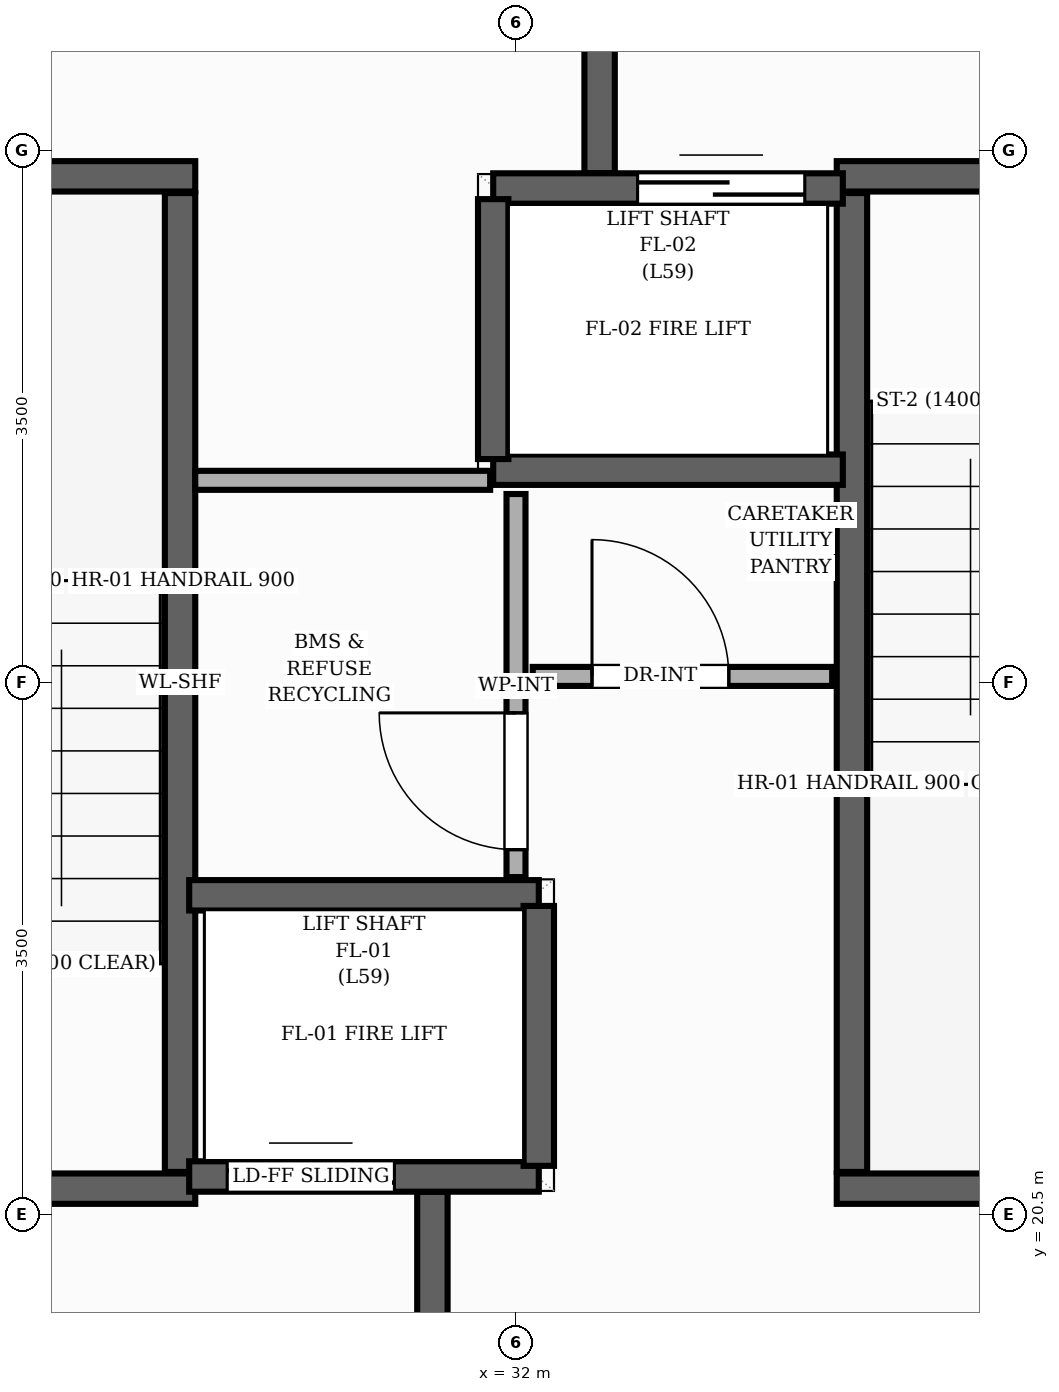
"""IFC4 building model, lengths in metres.
Left out: names, types, materials, properties, quantities, classifications, styles, units other than length and angle.
Written with IfcOpenShell. Run it as: python <this file> out.ifc"""

import sys

from ifc_helpers import new_model, si_unit, direction, frame, frame_2d, origin, place, context, subcontext, project, spatial, rectangle, extrude, element, fill, save


model = new_model("IFC4")
c1 = context("Model", 3, precision=1e-05, world=origin(), true_north=direction((0.0, 1.0)))
c2 = subcontext(c1, "Body", "Model", "MODEL_VIEW")
j1 = project(units=[si_unit("LENGTHUNIT", "METRE"), si_unit("PLANEANGLEUNIT", "RADIAN")], contexts=[c1])
p1 = place(None, origin())
s1 = spatial("IfcSite", under=j1, at=p1, CompositionType="ELEMENT")
p2 = place(p1, origin())
s2 = spatial("IfcBuilding", under=s1, at=p2, CompositionType="ELEMENT")
p3 = place(p2, frame((0.0, 0.0, 195.04)))
s3 = spatial("IfcBuildingStorey", under=s2, at=p3, CompositionType="ELEMENT", Elevation=195.04)
p4 = place(p3, frame((29.79, 20.78, 0.0), z_axis=(0.0, 0.0, 1.0), x_axis=(0.0, 1.0, 0.0)))
e1 = element("IfcWall", 1, at=p4, inside=s3, PredefinedType="SHEAR", context=c2, shape_type="SweptSolid", body=[
    extrude(rectangle(XDim=6.44, YDim=0.2, at=frame_2d((3.22, 0.0))), origin(), (0.0, 0.0, 1.0), 3.2),
])
p5 = place(p3, frame((26.65, 27.33, 0.0), z_axis=(0.0, 0.0, 1.0), x_axis=(1.0, 0.0, 0.0)))
e2 = element("IfcWall", 2, at=p5, inside=s3, PredefinedType="SHEAR", context=c2, shape_type="SweptSolid", body=[
    extrude(rectangle(XDim=3.24, YDim=0.2, at=frame_2d((1.62, 0.0))), origin(), (0.0, 0.0, 1.0), 3.2),
])
p6 = place(p3, frame((26.65, 20.67, 0.0), z_axis=(0.0, 0.0, 1.0), x_axis=(1.0, 0.0, 0.0)))
e3 = element("IfcWall", 3, at=p6, inside=s3, PredefinedType="SHEAR", context=c2, shape_type="SweptSolid", body=[
    extrude(rectangle(XDim=3.24, YDim=0.2, at=frame_2d((1.62, 0.0))), origin(), (0.0, 0.0, 1.0), 3.2),
])
p7 = place(p6, frame((1.055, 0.0, 0.0)))
e4 = element("IfcOpeningElement", 4, at=p7, cuts=e3, PredefinedType="OPENING", context=c2, shape_type="SweptSolid", body=[
    extrude(rectangle(XDim=1.05, YDim=2.15, at=frame_2d((0.525, 1.075))), frame((0.0, 0.11, 0.0), z_axis=(0.0, -1.0, 0.0), x_axis=(1.0, 0.0, 0.0)), (0.0, 0.0, 1.0), 0.22),
])
p8 = place(p3, frame((34.21, 20.78, 0.0), z_axis=(0.0, 0.0, 1.0), x_axis=(0.0, 1.0, 0.0)))
e5 = element("IfcWall", 5, at=p8, inside=s3, PredefinedType="SHEAR", context=c2, shape_type="SweptSolid", body=[
    extrude(rectangle(XDim=6.44, YDim=0.2, at=frame_2d((3.22, 0.0))), origin(), (0.0, 0.0, 1.0), 3.2),
])
p9 = place(p3, frame((34.11, 20.67, 0.0), z_axis=(0.0, 0.0, 1.0), x_axis=(1.0, 0.0, 0.0)))
e6 = element("IfcWall", 6, at=p9, inside=s3, PredefinedType="SHEAR", context=c2, shape_type="SweptSolid", body=[
    extrude(rectangle(XDim=3.24, YDim=0.2, at=frame_2d((1.62, 0.0))), origin(), (0.0, 0.0, 1.0), 3.2),
])
p10 = place(p3, frame((34.11, 27.33, 0.0), z_axis=(0.0, 0.0, 1.0), x_axis=(1.0, 0.0, 0.0)))
e7 = element("IfcWall", 7, at=p10, inside=s3, PredefinedType="SHEAR", context=c2, shape_type="SweptSolid", body=[
    extrude(rectangle(XDim=3.24, YDim=0.2, at=frame_2d((1.62, 0.0))), origin(), (0.0, 0.0, 1.0), 3.2),
])
p11 = place(p10, frame((1.135, 0.0, 0.0)))
e8 = element("IfcOpeningElement", 8, at=p11, cuts=e7, PredefinedType="OPENING", context=c2, shape_type="SweptSolid", body=[
    extrude(rectangle(XDim=1.05, YDim=2.15, at=frame_2d((0.525, 1.075))), frame((0.0, 0.11, 0.0), z_axis=(0.0, -1.0, 0.0), x_axis=(1.0, 0.0, 0.0)), (0.0, 0.0, 1.0), 0.22),
])
for number, where, z_axis, x_axis in (
    (9, (31.45, 17.15, 0.0), (0.0, 0.0, 1.0), (0.0, 1.0, 0.0)),
    (10, (32.55, 27.35, 0.0), (0.0, 0.0, 1.0), (0.0, 1.0, 0.0)),
):
    element("IfcWall", number, at=place(p3, frame(where, z_axis=z_axis, x_axis=x_axis)), inside=s3, PredefinedType="SHEAR", context=c2, shape_type="SweptSolid", body=[
        extrude(rectangle(XDim=3.5, YDim=0.2, at=frame_2d((1.75, 0.0))), origin(), (0.0, 0.0, 1.0), 3.2),
    ])
p12 = place(p3, frame((29.85, 20.75, 0.0), z_axis=(0.0, 0.0, 1.0), x_axis=(1.0, 0.0, 0.0)))
e11 = element("IfcWall", 11, at=p12, inside=s3, PredefinedType="SHEAR", context=c2, shape_type="SweptSolid", body=[
    extrude(rectangle(XDim=2.3, YDim=0.2, at=frame_2d((1.15, 0.0))), origin(), (0.0, 0.0, 1.0), 3.2),
])
p13 = place(p12, frame((0.25, 0.0, 0.0)))
e12 = element("IfcOpeningElement", 12, at=p13, cuts=e11, PredefinedType="OPENING", context=c2, shape_type="SweptSolid", body=[
    extrude(rectangle(XDim=1.1, YDim=2.15, at=frame_2d((0.55, 1.075))), frame((0.0, 0.11, 0.0), z_axis=(0.0, -1.0, 0.0), x_axis=(1.0, 0.0, 0.0)), (0.0, 0.0, 1.0), 0.22),
])
p14 = place(p3, frame((29.85, 22.6, 0.0), z_axis=(0.0, 0.0, 1.0), x_axis=(1.0, 0.0, 0.0)))
e13 = element("IfcWall", 13, at=p14, inside=s3, PredefinedType="SHEAR", context=c2, shape_type="SweptSolid", body=[
    extrude(rectangle(XDim=2.3, YDim=0.2, at=frame_2d((1.15, 0.0))), origin(), (0.0, 0.0, 1.0), 3.2),
])
p15 = place(p3, frame((32.15, 20.82, 0.0), z_axis=(0.0, 0.0, 1.0), x_axis=(0.0, 1.0, 0.0)))
e14 = element("IfcWall", 14, at=p15, inside=s3, PredefinedType="SHEAR", context=c2, shape_type="SweptSolid", body=[
    extrude(rectangle(XDim=1.71, YDim=0.2, at=frame_2d((0.855, 0.0))), origin(), (0.0, 0.0, 1.0), 3.2),
])
p16 = place(p3, frame((31.85, 27.25, 0.0), z_axis=(0.0, 0.0, 1.0), x_axis=(1.0, 0.0, 0.0)))
e15 = element("IfcWall", 15, at=p16, inside=s3, PredefinedType="SHEAR", context=c2, shape_type="SweptSolid", body=[
    extrude(rectangle(XDim=2.3, YDim=0.2, at=frame_2d((1.15, 0.0))), origin(), (0.0, 0.0, 1.0), 3.2),
])
p17 = place(p16, frame((0.95, 0.0, 0.0)))
e16 = element("IfcOpeningElement", 16, at=p17, cuts=e15, PredefinedType="OPENING", context=c2, shape_type="SweptSolid", body=[
    extrude(rectangle(XDim=1.1, YDim=2.15, at=frame_2d((0.55, 1.075))), frame((0.0, 0.11, 0.0), z_axis=(0.0, -1.0, 0.0), x_axis=(1.0, 0.0, 0.0)), (0.0, 0.0, 1.0), 0.22),
])
p18 = place(p3, frame((31.85, 25.4, 0.0), z_axis=(0.0, 0.0, 1.0), x_axis=(1.0, 0.0, 0.0)))
e17 = element("IfcWall", 17, at=p18, inside=s3, PredefinedType="SHEAR", context=c2, shape_type="SweptSolid", body=[
    extrude(rectangle(XDim=2.3, YDim=0.2, at=frame_2d((1.15, 0.0))), origin(), (0.0, 0.0, 1.0), 3.2),
])
p19 = place(p3, frame((31.85, 25.47, 0.0), z_axis=(0.0, 0.0, 1.0), x_axis=(0.0, 1.0, 0.0)))
e18 = element("IfcWall", 18, at=p19, inside=s3, PredefinedType="SHEAR", context=c2, shape_type="SweptSolid", body=[
    extrude(rectangle(XDim=1.71, YDim=0.2, at=frame_2d((0.855, 0.0))), origin(), (0.0, 0.0, 1.0), 3.2),
])
p20 = place(p3, frame((32.0, 22.72, 0.0), z_axis=(0.0, 0.0, 1.0), x_axis=(0.0, 1.0, 0.0)))
e19 = element("IfcWall", 19, at=p20, inside=s3, PredefinedType="PARTITIONING", context=c2, shape_type="SweptSolid", body=[
    extrude(rectangle(XDim=2.52, YDim=0.125, at=frame_2d((1.26, 0.0))), origin(), (0.0, 0.0, 1.0), 2.955),
])
p21 = place(p20, frame((0.18, 0.0, 0.0)))
e20 = element("IfcOpeningElement", 20, at=p21, cuts=e19, PredefinedType="OPENING", context=c2, shape_type="SweptSolid", body=[
    extrude(rectangle(XDim=0.9, YDim=2.1, at=frame_2d((0.45, 1.05))), frame((0.0, 0.073, 0.0), z_axis=(0.0, -1.0, 0.0), x_axis=(1.0, 0.0, 0.0)), (0.0, 0.0, 1.0), 0.145),
])
p22 = place(p3, frame((32.11, 24.04, 0.0), z_axis=(0.0, 0.0, 1.0), x_axis=(1.0, 0.0, 0.0)))
e21 = element("IfcWall", 21, at=p22, inside=s3, PredefinedType="PARTITIONING", context=c2, shape_type="SweptSolid", body=[
    extrude(rectangle(XDim=1.97, YDim=0.125, at=frame_2d((0.985, 0.0))), origin(), (0.0, 0.0, 1.0), 2.955),
])
p23 = place(p22, frame((0.39, 0.0, 0.0)))
e22 = element("IfcOpeningElement", 22, at=p23, cuts=e21, PredefinedType="OPENING", context=c2, shape_type="SweptSolid", body=[
    extrude(rectangle(XDim=0.9, YDim=2.1, at=frame_2d((0.45, 1.05))), frame((0.0, 0.073, 0.0), z_axis=(0.0, -1.0, 0.0), x_axis=(1.0, 0.0, 0.0)), (0.0, 0.0, 1.0), 0.145),
])
p24 = place(p3, frame((29.89, 25.33, 0.0), z_axis=(0.0, 0.0, 1.0), x_axis=(1.0, 0.0, 0.0)))
e23 = element("IfcWall", 23, at=p24, inside=s3, PredefinedType="PARTITIONING", context=c2, shape_type="SweptSolid", body=[
    extrude(rectangle(XDim=1.94, YDim=0.125, at=frame_2d((0.97, 0.0))), origin(), (0.0, 0.0, 1.0), 2.955),
])
p25 = place(p13, origin())
e24 = element("IfcDoor", 24, at=p25, inside=s3, OperationType="DOUBLE_DOOR_SLIDING", PredefinedType="DOOR", context=c2, shape_type="SweptSolid", body=[
    extrude(rectangle(XDim=1.1, YDim=2.15, at=frame_2d((0.55, 1.075))), frame((0.0, 0.025, 0.0), z_axis=(0.0, -1.0, 0.0), x_axis=(1.0, 0.0, 0.0)), (0.0, 0.0, 1.0), 0.05),
])
fill(e12, e24)
p26 = place(p17, origin())
e25 = element("IfcDoor", 25, at=p26, inside=s3, OperationType="DOUBLE_DOOR_SLIDING", PredefinedType="DOOR", context=c2, shape_type="SweptSolid", body=[
    extrude(rectangle(XDim=1.1, YDim=2.15, at=frame_2d((0.55, 1.075))), frame((0.0, 0.025, 0.0), z_axis=(0.0, -1.0, 0.0), x_axis=(1.0, 0.0, 0.0)), (0.0, 0.0, 1.0), 0.05),
])
fill(e16, e25)
p27 = place(p23, origin())
e26 = element("IfcDoor", 26, at=p27, inside=s3, OperationType="SINGLE_SWING_LEFT", PredefinedType="DOOR", context=c2, shape_type="SweptSolid", body=[
    extrude(rectangle(XDim=0.9, YDim=2.1, at=frame_2d((0.45, 1.05))), frame((0.0, 0.025, 0.0), z_axis=(0.0, -1.0, 0.0), x_axis=(1.0, 0.0, 0.0)), (0.0, 0.0, 1.0), 0.05),
])
fill(e22, e26)
p28 = place(p21, origin())
e27 = element("IfcDoor", 27, at=p28, inside=s3, OperationType="SINGLE_SWING_RIGHT", PredefinedType="DOOR", context=c2, shape_type="SweptSolid", body=[
    extrude(rectangle(XDim=0.9, YDim=2.1, at=frame_2d((0.45, 1.05))), frame((0.0, 0.025, 0.0), z_axis=(0.0, -1.0, 0.0), x_axis=(1.0, 0.0, 0.0)), (0.0, 0.0, 1.0), 0.05),
])
fill(e20, e27)
save(model, sys.argv[1])
